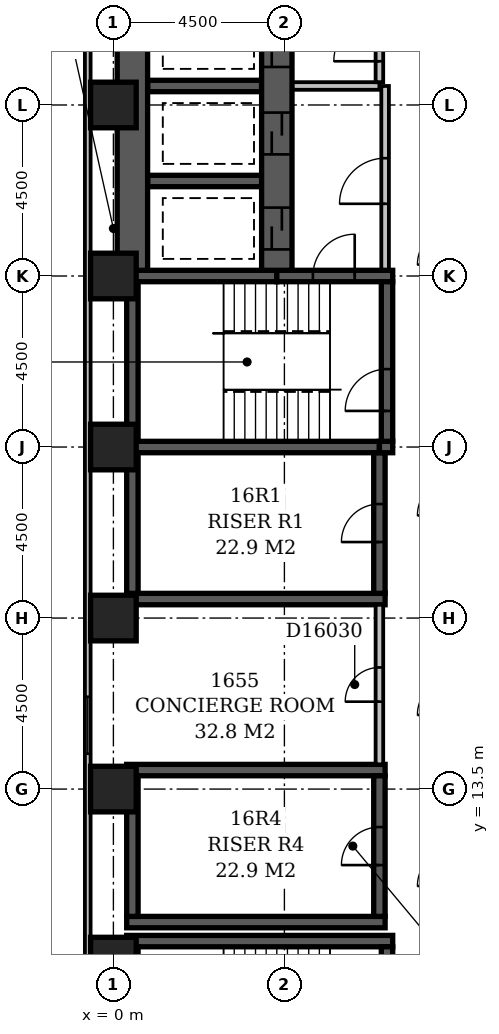
"""IFC4 building model, lengths in metres.
Left out: names, types, materials, properties, quantities, classifications, styles, units other than length and angle.
Written with IfcOpenShell. Run it as: python <this file> out.ifc"""

import sys

from ifc_helpers import new_model, si_unit, direction, frame, frame_2d, origin, origin_2d, place, context, subcontext, project, spatial, rectangle, extrude, element, fill, save


model = new_model("IFC4")
c1 = context("Model", 3, precision=1e-05, world=origin(), true_north=direction((0.0, 1.0)))
c2 = subcontext(c1, "Body", "Model", "MODEL_VIEW")
j1 = project(units=[si_unit("LENGTHUNIT", "METRE"), si_unit("PLANEANGLEUNIT", "RADIAN")], contexts=[c1])
p1 = place(None, origin())
s1 = spatial("IfcSite", under=j1, at=p1, CompositionType="ELEMENT")
p2 = place(p1, origin())
s2 = spatial("IfcBuilding", under=s1, at=p2, CompositionType="ELEMENT")
p3 = place(p2, frame((0.0, 0.0, 68.6)))
s3 = spatial("IfcBuildingStorey", under=s2, at=p3, CompositionType="ELEMENT", Elevation=68.6)
p4 = place(p3, frame((0.35, 9.5, -0.3), z_axis=(0.0, 0.0, 1.0), x_axis=(1.0, 0.0, 0.0)))
e1 = element("IfcWall", 1, at=p4, inside=s3, PredefinedType="SHEAR", context=c2, shape_type="SweptSolid", body=[
    extrude(rectangle(XDim=7.0, YDim=0.3, at=frame_2d((3.5, 0.0))), origin(), (0.0, 0.0, 1.0), 3.6),
])
for number, where, z_axis, x_axis in (
    (2, (0.35, 10.0, -0.3), (0.0, 0.0, 1.0), (1.0, 0.0, 0.0)),
    (3, (0.35, 14.0, -0.3), (0.0, 0.0, 1.0), (1.0, 0.0, 0.0)),
    (4, (0.35, 18.5, -0.3), (0.0, 0.0, 1.0), (1.0, 0.0, 0.0)),
):
    element("IfcWall", number, at=place(p3, frame(where, z_axis=z_axis, x_axis=x_axis)), inside=s3, PredefinedType="SHEAR", context=c2, shape_type="SweptSolid", body=[
        extrude(rectangle(XDim=6.8, YDim=0.3, at=frame_2d((3.4, 0.0))), origin(), (0.0, 0.0, 1.0), 3.6),
    ])
p5 = place(p3, frame((0.35, 22.5, -0.3), z_axis=(0.0, 0.0, 1.0), x_axis=(1.0, 0.0, 0.0)))
e5 = element("IfcWall", 5, at=p5, inside=s3, PredefinedType="SHEAR", context=c2, shape_type="SweptSolid", body=[
    extrude(rectangle(XDim=6.65, YDim=0.3, at=frame_2d((3.325, 0.0))), origin(), (0.0, 0.0, 1.0), 3.6),
])
p6 = place(p3, frame((0.35, 27.0, -0.3), z_axis=(0.0, 0.0, 1.0), x_axis=(1.0, 0.0, 0.0)))
e6 = element("IfcWall", 6, at=p6, inside=s3, PredefinedType="SHEAR", context=c2, shape_type="SweptSolid", body=[
    extrude(rectangle(XDim=3.95, YDim=0.3, at=frame_2d((1.975, 0.0))), origin(), (0.0, 0.0, 1.0), 3.6),
])
p7 = place(p3, frame((0.5, 5.15, -0.3), z_axis=(0.0, 0.0, 1.0), x_axis=(0.0, 1.0, 0.0)))
e7 = element("IfcWall", 7, at=p7, inside=s3, PredefinedType="SHEAR", context=c2, shape_type="SweptSolid", body=[
    extrude(rectangle(XDim=4.2, YDim=0.3, at=frame_2d((2.1, 0.0))), origin(), (0.0, 0.0, 1.0), 3.6),
])
for number, where, z_axis, x_axis in (
    (8, (0.5, 10.15, -0.3), (0.0, 0.0, 1.0), (0.0, 1.0, 0.0)),
    (9, (0.5, 18.65, -0.3), (0.0, 0.0, 1.0), (0.0, 1.0, 0.0)),
):
    element("IfcWall", number, at=place(p3, frame(where, z_axis=z_axis, x_axis=x_axis)), inside=s3, PredefinedType="SHEAR", context=c2, shape_type="SweptSolid", body=[
        extrude(rectangle(XDim=3.7, YDim=0.3, at=frame_2d((1.85, 0.0))), origin(), (0.0, 0.0, 1.0), 3.6),
    ])
p8 = place(p3, frame((0.5, 22.65, -0.3), z_axis=(0.0, 0.0, 1.0), x_axis=(0.0, 1.0, 0.0)))
e10 = element("IfcWall", 10, at=p8, inside=s3, PredefinedType="SHEAR", context=c2, shape_type="SweptSolid", body=[
    extrude(rectangle(XDim=4.2, YDim=0.3, at=frame_2d((2.1, 0.0))), origin(), (0.0, 0.0, 1.0), 3.6),
])
p9 = place(p3, frame((0.5, 27.15, -0.3), z_axis=(0.0, 0.0, 1.0), x_axis=(0.0, 1.0, 0.0)))
e11 = element("IfcWall", 11, at=p9, inside=s3, PredefinedType="SHEAR", context=c2, shape_type="SweptSolid", body=[
    extrude(rectangle(XDim=6.95, YDim=0.8, at=frame_2d((3.475, 0.0))), origin(), (0.0, 0.0, 1.0), 3.6),
])
for number, where, z_axis, x_axis in (
    (12, (0.9, 29.5, -0.3), (0.0, 0.0, 1.0), (1.0, 0.0, 0.0)),
    (13, (0.9, 32.0, -0.3), (0.0, 0.0, 1.0), (1.0, 0.0, 0.0)),
):
    element("IfcWall", number, at=place(p3, frame(where, z_axis=z_axis, x_axis=x_axis)), inside=s3, PredefinedType="SHEAR", context=c2, shape_type="SweptSolid", body=[
        extrude(rectangle(XDim=3.0, YDim=0.3, at=frame_2d((1.5, 0.0))), origin(), (0.0, 0.0, 1.0), 3.6),
    ])
p10 = place(p3, frame((4.3, 27.0, -0.3), z_axis=(0.0, 0.0, 1.0), x_axis=(1.0, 0.0, 0.0)))
e14 = element("IfcWall", 14, at=p10, inside=s3, PredefinedType="SHEAR", context=c2, shape_type="SweptSolid", body=[
    extrude(rectangle(XDim=3.05, YDim=0.3, at=frame_2d((1.525, 0.0))), origin(), (0.0, 0.0, 1.0), 3.6),
])
p11 = place(p10, frame((0.95, 0.0, 0.3)))
e15 = element("IfcOpeningElement", 15, at=p11, cuts=e14, PredefinedType="OPENING", context=c2, shape_type="SweptSolid", body=[
    extrude(rectangle(XDim=1.1, YDim=2.1, at=frame_2d((0.55, 1.05))), frame((0.0, 0.162, 0.0), z_axis=(0.0, -1.0, 0.0), x_axis=(1.0, 0.0, 0.0)), (0.0, 0.0, 1.0), 0.324),
])
p12 = place(p3, frame((4.3, 27.15, -0.3), z_axis=(0.0, 0.0, 1.0), x_axis=(0.0, 1.0, 0.0)))
e16 = element("IfcWall", 16, at=p12, inside=s3, PredefinedType="SHEAR", context=c2, shape_type="SweptSolid", body=[
    extrude(rectangle(XDim=6.95, YDim=0.8, at=frame_2d((3.475, 0.0))), origin(), (0.0, 0.0, 1.0), 3.6),
])
p13 = place(p12, frame((3.05, 0.0, 0.3)))
e17 = element("IfcOpeningElement", 17, at=p13, cuts=e16, PredefinedType="OPENING", context=c2, shape_type="SweptSolid", body=[
    extrude(rectangle(XDim=1.1, YDim=2.1, at=frame_2d((0.55, 1.05))), frame((0.0, 0.412, 0.0), z_axis=(0.0, -1.0, 0.0), x_axis=(1.0, 0.0, 0.0)), (0.0, 0.0, 1.0), 0.824),
])
p14 = place(p12, frame((0.55, 0.0, 0.3)))
e18 = element("IfcOpeningElement", 18, at=p14, cuts=e16, PredefinedType="OPENING", context=c2, shape_type="SweptSolid", body=[
    extrude(rectangle(XDim=1.1, YDim=2.1, at=frame_2d((0.55, 1.05))), frame((0.0, 0.412, 0.0), z_axis=(0.0, -1.0, 0.0), x_axis=(1.0, 0.0, 0.0)), (0.0, 0.0, 1.0), 0.824),
])
p15 = place(p12, frame((5.35, 0.0, 0.3)))
e19 = element("IfcOpeningElement", 19, at=p15, cuts=e16, PredefinedType="OPENING", context=c2, shape_type="SweptSolid", body=[
    extrude(rectangle(XDim=1.1, YDim=2.1, at=frame_2d((0.55, 1.05))), frame((0.0, 0.412, 0.0), z_axis=(0.0, -1.0, 0.0), x_axis=(1.0, 0.0, 0.0)), (0.0, 0.0, 1.0), 0.824),
])
p16 = place(p3, frame((7.0, 10.15, -0.3), z_axis=(0.0, 0.0, 1.0), x_axis=(0.0, 1.0, 0.0)))
e20 = element("IfcWall", 20, at=p16, inside=s3, PredefinedType="SHEAR", context=c2, shape_type="SweptSolid", body=[
    extrude(rectangle(XDim=3.7, YDim=0.3, at=frame_2d((1.85, 0.0))), origin(), (0.0, 0.0, 1.0), 3.6),
])
p17 = place(p16, frame((1.35, 0.0, 0.3)))
e21 = element("IfcOpeningElement", 21, at=p17, cuts=e20, PredefinedType="OPENING", context=c2, shape_type="SweptSolid", body=[
    extrude(rectangle(XDim=1.0, YDim=2.1, at=frame_2d((0.5, 1.05))), frame((0.0, 0.162, 0.0), z_axis=(0.0, -1.0, 0.0), x_axis=(1.0, 0.0, 0.0)), (0.0, 0.0, 1.0), 0.324),
])
p18 = place(p3, frame((7.0, 18.65, -0.3), z_axis=(0.0, 0.0, 1.0), x_axis=(0.0, 1.0, 0.0)))
e22 = element("IfcWall", 22, at=p18, inside=s3, PredefinedType="SHEAR", context=c2, shape_type="SweptSolid", body=[
    extrude(rectangle(XDim=3.7, YDim=0.3, at=frame_2d((1.85, 0.0))), origin(), (0.0, 0.0, 1.0), 3.6),
])
p19 = place(p18, frame((1.35, 0.0, 0.3)))
e23 = element("IfcOpeningElement", 23, at=p19, cuts=e22, PredefinedType="OPENING", context=c2, shape_type="SweptSolid", body=[
    extrude(rectangle(XDim=1.0, YDim=2.1, at=frame_2d((0.5, 1.05))), frame((0.0, 0.162, 0.0), z_axis=(0.0, -1.0, 0.0), x_axis=(1.0, 0.0, 0.0)), (0.0, 0.0, 1.0), 0.324),
])
p20 = place(p3, frame((7.0, 22.5, -0.3), z_axis=(0.0, 0.0, 1.0), x_axis=(1.0, 0.0, 0.0)))
e24 = element("IfcWall", 24, at=p20, inside=s3, PredefinedType="SHEAR", context=c2, shape_type="SweptSolid", body=[
    extrude(rectangle(XDim=0.35, YDim=0.3, at=frame_2d((0.175, 0.0))), origin(), (0.0, 0.0, 1.0), 3.6),
])
p21 = place(p3, frame((7.2, 5.15, -0.3), z_axis=(0.0, 0.0, 1.0), x_axis=(0.0, 1.0, 0.0)))
e25 = element("IfcWall", 25, at=p21, inside=s3, PredefinedType="SHEAR", context=c2, shape_type="SweptSolid", body=[
    extrude(rectangle(XDim=4.2, YDim=0.3, at=frame_2d((2.1, 0.0))), origin(), (0.0, 0.0, 1.0), 3.6),
])
p22 = place(p21, frame((1.55, 0.0, 0.3)))
e26 = element("IfcOpeningElement", 26, at=p22, cuts=e25, PredefinedType="OPENING", context=c2, shape_type="SweptSolid", body=[
    extrude(rectangle(XDim=1.1, YDim=2.1, at=frame_2d((0.55, 1.05))), frame((0.0, 0.162, 0.0), z_axis=(0.0, -1.0, 0.0), x_axis=(1.0, 0.0, 0.0)), (0.0, 0.0, 1.0), 0.324),
])
p23 = place(p3, frame((7.2, 22.65, -0.3), z_axis=(0.0, 0.0, 1.0), x_axis=(0.0, 1.0, 0.0)))
e27 = element("IfcWall", 27, at=p23, inside=s3, PredefinedType="SHEAR", context=c2, shape_type="SweptSolid", body=[
    extrude(rectangle(XDim=4.2, YDim=0.3, at=frame_2d((2.1, 0.0))), origin(), (0.0, 0.0, 1.0), 3.6),
])
p24 = place(p23, frame((0.8, 0.0, 0.3)))
e28 = element("IfcOpeningElement", 28, at=p24, cuts=e27, PredefinedType="OPENING", context=c2, shape_type="SweptSolid", body=[
    extrude(rectangle(XDim=1.1, YDim=2.1, at=frame_2d((0.55, 1.05))), frame((0.0, 0.162, 0.0), z_axis=(0.0, -1.0, 0.0), x_axis=(1.0, 0.0, 0.0)), (0.0, 0.0, 1.0), 0.324),
])
for number, where, z_axis, x_axis in (
    (29, (0.0, 9.0, -0.3), (0.0, 0.0, 1.0), (1.0, 0.0, 0.0)),
    (30, (0.0, 13.5, -0.3), (0.0, 0.0, 1.0), (1.0, 0.0, 0.0)),
    (31, (0.0, 18.0, -0.3), (0.0, 0.0, 1.0), (1.0, 0.0, 0.0)),
    (32, (0.0, 22.5, -0.3), (0.0, 0.0, 1.0), (1.0, 0.0, 0.0)),
    (33, (0.0, 27.0, -0.3), (0.0, 0.0, 1.0), (1.0, 0.0, 0.0)),
    (34, (0.0, 31.5, -0.3), (0.0, 0.0, 1.0), (1.0, 0.0, 0.0)),
):
    element("IfcColumn", number, at=place(p3, frame(where, z_axis=z_axis, x_axis=x_axis)), inside=s3, PredefinedType="COLUMN", context=c2, shape_type="SweptSolid", body=[
        extrude(rectangle(XDim=1.2, YDim=1.2, at=origin_2d()), origin(), (0.0, 0.0, 1.0), 3.6),
    ])
p25 = place(p3, frame((-0.675, 59.1, 0.0), z_axis=(0.0, 0.0, 1.0), x_axis=(0.0, -1.0, 0.0)))
e35 = element("IfcWall", 35, at=p25, inside=s3, PredefinedType="STANDARD", context=c2, shape_type="SweptSolid", body=[
    extrude(rectangle(XDim=55.35, YDim=0.15, at=frame_2d((27.675, 0.0))), origin(), (0.0, 0.0, 1.0), 2.7),
])
p26 = place(p25, frame((16.17, 0.0, 0.6)))
e36 = element("IfcOpeningElement", 36, at=p26, cuts=e35, PredefinedType="OPENING", context=c2, shape_type="SweptSolid", body=[
    extrude(rectangle(XDim=1.5, YDim=1.8, at=frame_2d((0.75, 0.9))), frame((0.0, 0.087, 0.0), z_axis=(0.0, -1.0, 0.0), x_axis=(1.0, 0.0, 0.0)), (0.0, 0.0, 1.0), 0.174),
])
p27 = place(p25, frame((19.65, 0.0, 0.6)))
e37 = element("IfcOpeningElement", 37, at=p27, cuts=e35, PredefinedType="OPENING", context=c2, shape_type="SweptSolid", body=[
    extrude(rectangle(XDim=2.4, YDim=1.8, at=frame_2d((1.2, 0.9))), frame((0.0, 0.087, 0.0), z_axis=(0.0, -1.0, 0.0), x_axis=(1.0, 0.0, 0.0)), (0.0, 0.0, 1.0), 0.174),
])
p28 = place(p25, frame((43.17, 0.0, 0.6)))
e38 = element("IfcOpeningElement", 38, at=p28, cuts=e35, PredefinedType="OPENING", context=c2, shape_type="SweptSolid", body=[
    extrude(rectangle(XDim=1.5, YDim=1.8, at=frame_2d((0.75, 0.9))), frame((0.0, 0.087, 0.0), z_axis=(0.0, -1.0, 0.0), x_axis=(1.0, 0.0, 0.0)), (0.0, 0.0, 1.0), 0.174),
])
p29 = place(p3, frame((4.72, 32.0, 0.0), z_axis=(0.0, 0.0, 1.0), x_axis=(1.0, 0.0, 0.0)))
e39 = element("IfcWall", 39, at=p29, inside=s3, PredefinedType="PARTITIONING", context=c2, shape_type="SweptSolid", body=[
    extrude(rectangle(XDim=2.28, YDim=0.2, at=frame_2d((1.14, 0.0))), origin(), (0.0, 0.0, 1.0), 3.3),
])
p30 = place(p3, frame((7.0, 32.1, 0.0), z_axis=(0.0, 0.0, 1.0), x_axis=(0.0, 1.0, 0.0)))
e40 = element("IfcWall", 40, at=p30, inside=s3, PredefinedType="PARTITIONING", context=c2, shape_type="SweptSolid", body=[
    extrude(rectangle(XDim=2.4, YDim=0.2, at=frame_2d((1.2, 0.0))), origin(), (0.0, 0.0, 1.0), 3.3),
])
p31 = place(p30, frame((0.55, 0.0, 0.0)))
e41 = element("IfcOpeningElement", 41, at=p31, cuts=e40, PredefinedType="OPENING", context=c2, shape_type="SweptSolid", body=[
    extrude(rectangle(XDim=1.2, YDim=2.1, at=frame_2d((0.6, 1.05))), frame((0.0, 0.112, 0.0), z_axis=(0.0, -1.0, 0.0), x_axis=(1.0, 0.0, 0.0)), (0.0, 0.0, 1.0), 0.224),
])
p32 = place(p3, frame((7.15, 27.17, 0.0), z_axis=(0.0, 0.0, 1.0), x_axis=(0.0, 1.0, 0.0)))
e42 = element("IfcWall", 42, at=p32, inside=s3, PredefinedType="PARTITIONING", context=c2, shape_type="SweptSolid", body=[
    extrude(rectangle(XDim=4.83, YDim=0.2, at=frame_2d((2.415, 0.0))), origin(), (0.0, 0.0, 1.0), 3.3),
])
p33 = place(p32, frame((1.73, 0.0, 0.0)))
e43 = element("IfcOpeningElement", 43, at=p33, cuts=e42, PredefinedType="OPENING", context=c2, shape_type="SweptSolid", body=[
    extrude(rectangle(XDim=1.2, YDim=2.1, at=frame_2d((0.6, 1.05))), frame((0.0, 0.112, 0.0), z_axis=(0.0, -1.0, 0.0), x_axis=(1.0, 0.0, 0.0)), (0.0, 0.0, 1.0), 0.224),
])
p34 = place(p3, frame((7.0, 14.15, 0.0), z_axis=(0.0, 0.0, 1.0), x_axis=(0.0, 1.0, 0.0)))
e44 = element("IfcWall", 44, at=p34, inside=s3, PredefinedType="PARTITIONING", context=c2, shape_type="SweptSolid", body=[
    extrude(rectangle(XDim=4.2, YDim=0.2, at=frame_2d((2.1, 0.0))), origin(), (0.0, 0.0, 1.0), 3.3),
])
p35 = place(p34, frame((1.65, 0.0, 0.0)))
e45 = element("IfcOpeningElement", 45, at=p35, cuts=e44, PredefinedType="OPENING", context=c2, shape_type="SweptSolid", body=[
    extrude(rectangle(XDim=0.9, YDim=2.1, at=frame_2d((0.45, 1.05))), frame((0.0, 0.112, 0.0), z_axis=(0.0, -1.0, 0.0), x_axis=(1.0, 0.0, 0.0)), (0.0, 0.0, 1.0), 0.224),
])
p36 = place(p28, origin())
e46 = element("IfcWindow", 46, at=p36, inside=s3, PartitioningType="SINGLE_PANEL", PredefinedType="WINDOW", context=c2, shape_type="SweptSolid", body=[
    extrude(rectangle(XDim=1.5, YDim=1.8, at=frame_2d((0.75, 0.9))), frame((0.0, 0.03, 0.0), z_axis=(0.0, -1.0, 0.0), x_axis=(1.0, 0.0, 0.0)), (0.0, 0.0, 1.0), 0.06),
])
fill(e38, e46)
p37 = place(p33, origin())
e47 = element("IfcDoor", 47, at=p37, inside=s3, OperationType="SINGLE_SWING_LEFT", PredefinedType="DOOR", context=c2, shape_type="SweptSolid", body=[
    extrude(rectangle(XDim=1.2, YDim=2.1, at=frame_2d((0.6, 1.05))), frame((0.0, 0.025, 0.0), z_axis=(0.0, -1.0, 0.0), x_axis=(1.0, 0.0, 0.0)), (0.0, 0.0, 1.0), 0.05),
])
fill(e43, e47)
p38 = place(p13, origin())
e48 = element("IfcDoor", 48, at=p38, inside=s3, OperationType="SLIDING_TO_LEFT", PredefinedType="DOOR", context=c2, shape_type="SweptSolid", body=[
    extrude(rectangle(XDim=1.1, YDim=2.1, at=frame_2d((0.55, 1.05))), frame((0.0, 0.025, 0.0), z_axis=(0.0, -1.0, 0.0), x_axis=(1.0, 0.0, 0.0)), (0.0, 0.0, 1.0), 0.05),
])
fill(e17, e48)
p39 = place(p14, origin())
e49 = element("IfcDoor", 49, at=p39, inside=s3, OperationType="SLIDING_TO_LEFT", PredefinedType="DOOR", context=c2, shape_type="SweptSolid", body=[
    extrude(rectangle(XDim=1.1, YDim=2.1, at=frame_2d((0.55, 1.05))), frame((0.0, 0.025, 0.0), z_axis=(0.0, -1.0, 0.0), x_axis=(1.0, 0.0, 0.0)), (0.0, 0.0, 1.0), 0.05),
])
fill(e18, e49)
p40 = place(p31, origin())
e50 = element("IfcDoor", 50, at=p40, inside=s3, OperationType="SINGLE_SWING_LEFT", PredefinedType="DOOR", context=c2, shape_type="SweptSolid", body=[
    extrude(rectangle(XDim=1.2, YDim=2.1, at=frame_2d((0.6, 1.05))), frame((0.0, 0.025, 0.0), z_axis=(0.0, -1.0, 0.0), x_axis=(1.0, 0.0, 0.0)), (0.0, 0.0, 1.0), 0.05),
])
fill(e41, e50)
p41 = place(p15, origin())
e51 = element("IfcDoor", 51, at=p41, inside=s3, OperationType="SLIDING_TO_LEFT", PredefinedType="DOOR", context=c2, shape_type="SweptSolid", body=[
    extrude(rectangle(XDim=1.1, YDim=2.1, at=frame_2d((0.55, 1.05))), frame((0.0, 0.025, 0.0), z_axis=(0.0, -1.0, 0.0), x_axis=(1.0, 0.0, 0.0)), (0.0, 0.0, 1.0), 0.05),
])
fill(e19, e51)
p42 = place(p19, origin())
e52 = element("IfcDoor", 52, at=p42, inside=s3, OperationType="SINGLE_SWING_LEFT", PredefinedType="DOOR", context=c2, shape_type="SweptSolid", body=[
    extrude(rectangle(XDim=1.0, YDim=2.1, at=frame_2d((0.5, 1.05))), frame((0.0, 0.025, 0.0), z_axis=(0.0, -1.0, 0.0), x_axis=(1.0, 0.0, 0.0)), (0.0, 0.0, 1.0), 0.05),
])
fill(e23, e52)
p43 = place(p17, origin())
e53 = element("IfcDoor", 53, at=p43, inside=s3, OperationType="SINGLE_SWING_LEFT", PredefinedType="DOOR", context=c2, shape_type="SweptSolid", body=[
    extrude(rectangle(XDim=1.0, YDim=2.1, at=frame_2d((0.5, 1.05))), frame((0.0, 0.025, 0.0), z_axis=(0.0, -1.0, 0.0), x_axis=(1.0, 0.0, 0.0)), (0.0, 0.0, 1.0), 0.05),
])
fill(e21, e53)
p44 = place(p11, frame((1.1, 0.0, 0.0), z_axis=(0.0, 0.0, 1.0), x_axis=(-1.0, 0.0, 0.0)))
e54 = element("IfcDoor", 54, at=p44, inside=s3, OperationType="SINGLE_SWING_LEFT", PredefinedType="DOOR", context=c2, shape_type="SweptSolid", body=[
    extrude(rectangle(XDim=1.1, YDim=2.1, at=frame_2d((0.55, 1.05))), frame((0.0, 0.025, 0.0), z_axis=(0.0, -1.0, 0.0), x_axis=(1.0, 0.0, 0.0)), (0.0, 0.0, 1.0), 0.05),
])
fill(e15, e54)
p45 = place(p24, origin())
e55 = element("IfcDoor", 55, at=p45, inside=s3, OperationType="SINGLE_SWING_LEFT", PredefinedType="DOOR", context=c2, shape_type="SweptSolid", body=[
    extrude(rectangle(XDim=1.1, YDim=2.1, at=frame_2d((0.55, 1.05))), frame((0.0, 0.025, 0.0), z_axis=(0.0, -1.0, 0.0), x_axis=(1.0, 0.0, 0.0)), (0.0, 0.0, 1.0), 0.05),
])
fill(e28, e55)
p46 = place(p35, origin())
e56 = element("IfcDoor", 56, at=p46, inside=s3, OperationType="SINGLE_SWING_LEFT", PredefinedType="DOOR", context=c2, shape_type="SweptSolid", body=[
    extrude(rectangle(XDim=0.9, YDim=2.1, at=frame_2d((0.45, 1.05))), frame((0.0, 0.025, 0.0), z_axis=(0.0, -1.0, 0.0), x_axis=(1.0, 0.0, 0.0)), (0.0, 0.0, 1.0), 0.05),
])
fill(e45, e56)
save(model, sys.argv[1])
